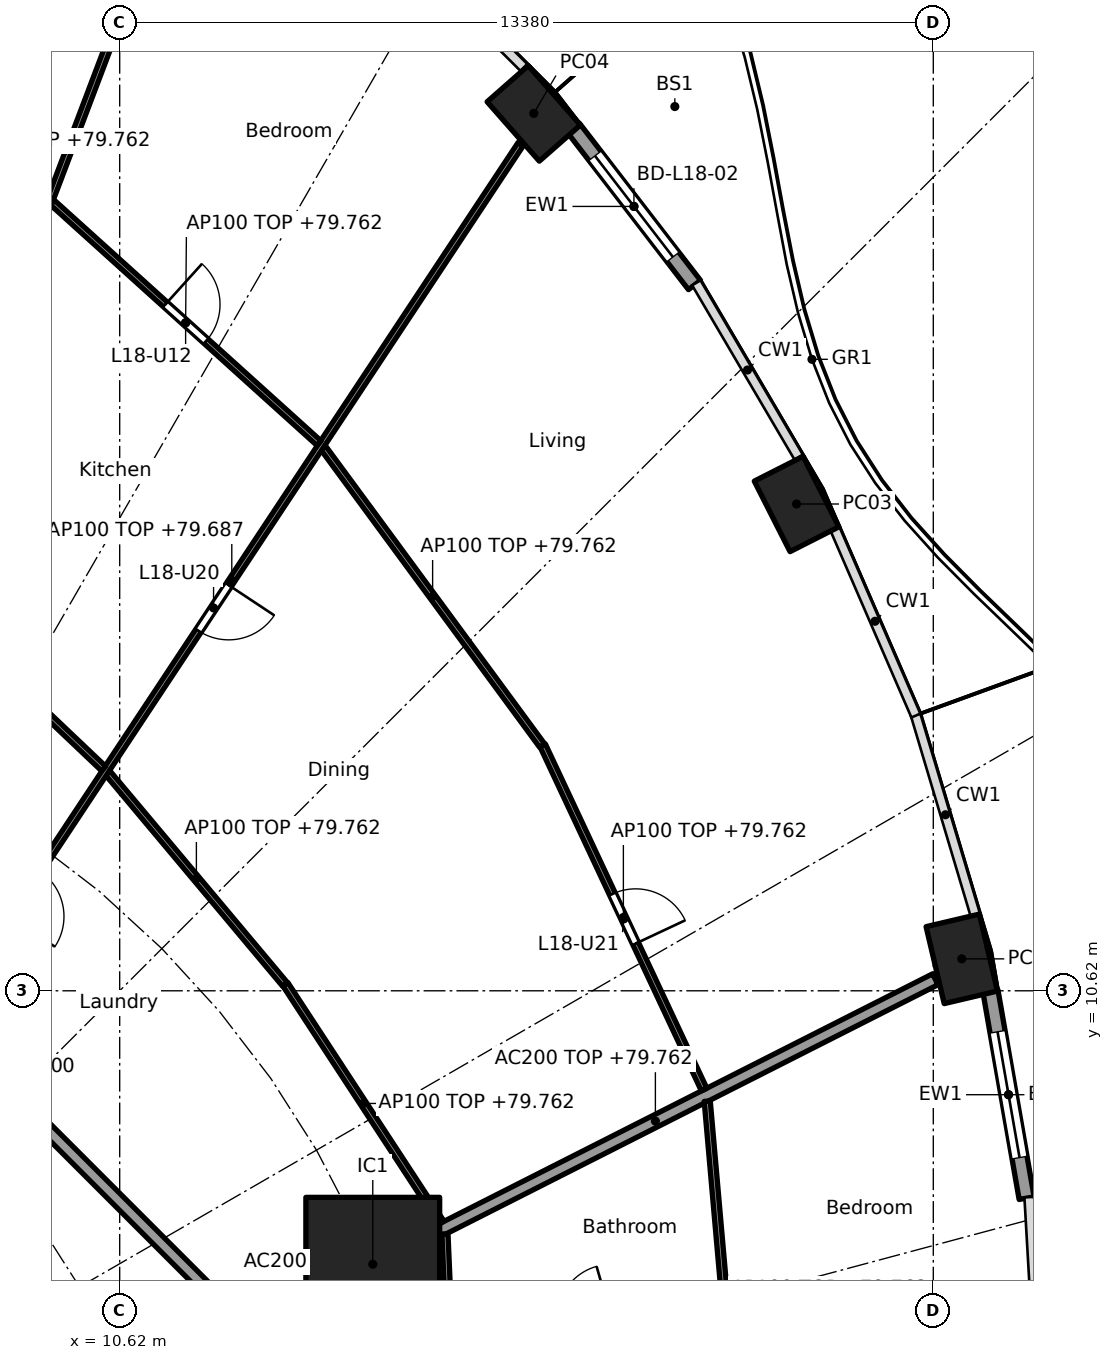
"""IFC4 building model, lengths in metres.
Left out: names, types, materials, properties, quantities, classifications, styles, units other than length and angle.
Written with IfcOpenShell. Run it as: python <this file> out.ifc"""

import sys

from ifc_helpers import new_model, si_unit, direction, frame, frame_2d, origin, origin_2d, place, context, subcontext, project, spatial, rectangle, hollow_rectangle, extrude, element, fill, save


model = new_model("IFC4")
c1 = context("Model", 3, precision=1e-05, world=origin(), true_north=direction((0.0, 1.0)))
c2 = subcontext(c1, "Body", "Model", "MODEL_VIEW")
j1 = project(units=[si_unit("LENGTHUNIT", "METRE"), si_unit("PLANEANGLEUNIT", "RADIAN")], contexts=[c1])
p1 = place(None, origin())
s1 = spatial("IfcSite", under=j1, at=p1, CompositionType="ELEMENT")
p2 = place(p1, origin())
s2 = spatial("IfcBuilding", under=s1, at=p2, CompositionType="ELEMENT")
p3 = place(p2, frame((0.0, 0.0, 77.0)))
s3 = spatial("IfcBuildingStorey", under=s2, at=p3, CompositionType="ELEMENT", Elevation=77.0)
for number, where, z_axis, x_axis in (
    (1, (24.468, 11.145, 0.0), (0.0, 0.0, 1.0), (-0.229, 0.973, 0.0)),
    (2, (21.751, 18.625, 0.0), (0.0, 0.0, 1.0), (-0.452, 0.892, 0.0)),
    (3, (17.43, 25.049, 0.0), (0.0, 0.0, 1.0), (-0.66, 0.751, 0.0)),
):
    element("IfcColumn", number, at=place(p3, frame(where, z_axis=z_axis, x_axis=x_axis)), inside=s3, PredefinedType="COLUMN", context=c2, shape_type="SweptSolid", body=[
        extrude(hollow_rectangle(XDim=1.3, YDim=0.9, WallThickness=0.045, at=origin_2d()), origin(), (0.0, 0.0, 1.0), 3.7),
    ])
p4 = place(p3, frame((14.782, 6.123, 0.0), z_axis=(0.0, 0.0, 1.0), x_axis=(1.0, 0.0, 0.0)))
e4 = element("IfcColumn", 4, at=p4, inside=s3, PredefinedType="COLUMN", context=c2, shape_type="SweptSolid", body=[
    extrude(rectangle(XDim=2.2, YDim=2.2, at=origin_2d()), origin(), (0.0, 0.0, 1.0), 3.7),
])
p5 = place(p3, frame((24.94, 10.613, 0.0), z_axis=(0.0, 0.0, 1.0), x_axis=(0.172164316671, -0.985068245385, 0.0)))
e5 = element("IfcWall", 5, at=p5, inside=s3, PredefinedType="SOLIDWALL", context=c2, shape_type="SweptSolid", body=[
    extrude(rectangle(XDim=3.454, YDim=0.25, at=frame_2d((1.727, 0.0))), origin(), (0.0, 0.0, 1.0), 3.44),
])
p6 = place(p5, frame((0.677, 0.0, 0.0)))
e6 = element("IfcOpeningElement", 6, at=p6, cuts=e5, PredefinedType="OPENING", context=c2, shape_type="SweptSolid", body=[
    extrude(rectangle(XDim=2.1, YDim=2.4, at=frame_2d((1.05, 1.2))), frame((0.0, 0.135, 0.0), z_axis=(0.0, -1.0, 0.0), x_axis=(1.0, 0.0, 0.0)), (0.0, 0.0, 1.0), 0.27),
])
p7 = place(p3, frame((18.081, 24.811, 0.0), z_axis=(0.0, 0.0, 1.0), x_axis=(0.610458970322, -0.792047880847, 0.0)))
e7 = element("IfcWall", 7, at=p7, inside=s3, PredefinedType="SOLIDWALL", context=c2, shape_type="SweptSolid", body=[
    extrude(rectangle(XDim=3.263, YDim=0.25, at=frame_2d((1.631, 0.0))), origin(), (0.0, 0.0, 1.0), 3.44),
])
p8 = place(p7, frame((0.582, 0.0, 0.0)))
e8 = element("IfcOpeningElement", 8, at=p8, cuts=e7, PredefinedType="OPENING", context=c2, shape_type="SweptSolid", body=[
    extrude(rectangle(XDim=2.1, YDim=2.4, at=frame_2d((1.05, 1.2))), frame((0.0, 0.135, 0.0), z_axis=(0.0, -1.0, 0.0), x_axis=(1.0, 0.0, 0.0)), (0.0, 0.0, 1.0), 0.27),
])
p9 = place(p3, frame((9.988, 4.613, 0.0), z_axis=(0.0, 0.0, 1.0), x_axis=(-0.707106781187, 0.707106781187, 0.0)))
e9 = element("IfcWall", 9, at=p9, inside=s3, PredefinedType="SHEAR", context=c2, shape_type="SweptSolid", body=[
    extrude(rectangle(XDim=7.602, YDim=0.6, at=frame_2d((3.801, 0.0))), origin(), (0.0, 0.0, 1.0), 3.44),
])
p10 = place(p9, frame((3.201, 0.0, 0.0)))
e10 = element("IfcOpeningElement", 10, at=p10, cuts=e9, PredefinedType="OPENING", context=c2, shape_type="SweptSolid", body=[
    extrude(rectangle(XDim=1.2, YDim=2.1, at=frame_2d((0.6, 1.05))), frame((0.0, 0.31, 0.0), z_axis=(0.0, -1.0, 0.0), x_axis=(1.0, 0.0, 0.0)), (0.0, 0.0, 1.0), 0.62),
])
p11 = place(p3, frame((12.657, 5.243, 0.0), z_axis=(0.0, 0.0, 1.0), x_axis=(0.923876145736, 0.382691608661, 0.0)))
e11 = element("IfcWall", 11, at=p11, inside=s3, PredefinedType="PARTITIONING", context=c2, shape_type="SweptSolid", body=[
    extrude(rectangle(XDim=2.2, YDim=0.2, at=frame_2d((1.1, 0.0))), origin(), (0.0, 0.0, 1.0), 3.44),
])
p12 = place(p3, frame((14.827, 6.146, 0.0), z_axis=(0.0, 0.0, 1.0), x_axis=(0.892068075337, 0.451901038906, 0.0)))
e12 = element("IfcWall", 12, at=p12, inside=s3, PredefinedType="PARTITIONING", context=c2, shape_type="SweptSolid", body=[
    extrude(rectangle(XDim=10.32, YDim=0.2, at=frame_2d((5.16, 0.0))), origin(), (0.0, 0.0, 1.0), 2.762),
])
p13 = place(p3, frame((12.635, 5.134, 0.0), z_axis=(0.0, 0.0, 1.0), x_axis=(-0.707106781187, 0.707106781187, 0.0)))
e13 = element("IfcWall", 13, at=p13, inside=s3, PredefinedType="PARTITIONING", context=c2, shape_type="SweptSolid", body=[
    extrude(rectangle(XDim=10.609, YDim=0.2, at=frame_2d((5.305, 0.0))), origin(), (0.0, 0.0, 1.0), 3.44),
])
p14 = place(p3, frame((20.825, 2.642, 0.0), z_axis=(0.0, 0.0, 1.0), x_axis=(-0.087760219522, 0.996141628419, 0.0)))
e14 = element("IfcWall", 14, at=p14, inside=s3, PredefinedType="PARTITIONING", context=c2, shape_type="SweptSolid", body=[
    extrude(rectangle(XDim=6.187, YDim=0.1, at=frame_2d((3.094, 0.0))), origin(), (0.0, 0.0, 1.0), 2.762),
])
p15 = place(p3, frame((16.064, 4.415, 0.0), z_axis=(0.0, 0.0, 1.0), x_axis=(-0.043101501373, 0.999070698489, 0.0)))
e15 = element("IfcWall", 15, at=p15, inside=s3, PredefinedType="PARTITIONING", context=c2, shape_type="SweptSolid", body=[
    extrude(rectangle(XDim=2.209, YDim=0.1, at=frame_2d((1.104, 0.0))), origin(), (0.0, 0.0, 1.0), 3.44),
])
p16 = place(p3, frame((15.91, 6.806, 0.0), z_axis=(0.0, 0.0, 1.0), x_axis=(-0.547468243486, 0.836826458936, 0.0)))
e16 = element("IfcWall", 16, at=p16, inside=s3, PredefinedType="PARTITIONING", context=c2, shape_type="SweptSolid", body=[
    extrude(rectangle(XDim=4.688, YDim=0.1, at=frame_2d((2.344, 0.0))), origin(), (0.0, 0.0, 1.0), 2.762),
])
p17 = place(p3, frame((20.231, 8.995, 0.0), z_axis=(0.0, 0.0, 1.0), x_axis=(-0.424587886407, 0.905386727712, 0.0)))
e17 = element("IfcWall", 17, at=p17, inside=s3, PredefinedType="PARTITIONING", context=c2, shape_type="SweptSolid", body=[
    extrude(rectangle(XDim=6.254, YDim=0.1, at=frame_2d((3.127, 0.0))), origin(), (0.0, 0.0, 1.0), 2.762),
])
p18 = place(p17, frame((2.652, 0.0, 0.0)))
e18 = element("IfcOpeningElement", 18, at=p18, cuts=e17, PredefinedType="OPENING", context=c2, shape_type="SweptSolid", body=[
    extrude(rectangle(XDim=0.9, YDim=2.1, at=frame_2d((0.45, 1.05))), frame((0.0, 0.06, 0.0), z_axis=(0.0, -1.0, 0.0), x_axis=(1.0, 0.0, 0.0)), (0.0, 0.0, 1.0), 0.12),
])
p19 = place(p3, frame((13.339, 10.725, 0.0), z_axis=(0.0, 0.0, 1.0), x_axis=(-0.642515455924, 0.766272724882, 0.0)))
e19 = element("IfcWall", 19, at=p19, inside=s3, PredefinedType="PARTITIONING", context=c2, shape_type="SweptSolid", body=[
    extrude(rectangle(XDim=4.537, YDim=0.1, at=frame_2d((2.269, 0.0))), origin(), (0.0, 0.0, 1.0), 2.762),
])
p20 = place(p3, frame((17.567, 14.653, 0.0), z_axis=(0.0, 0.0, 1.0), x_axis=(-0.592391983588, 0.80564988536, 0.0)))
e20 = element("IfcWall", 20, at=p20, inside=s3, PredefinedType="PARTITIONING", context=c2, shape_type="SweptSolid", body=[
    extrude(rectangle(XDim=6.08, YDim=0.1, at=frame_2d((3.04, 0.0))), origin(), (0.0, 0.0, 1.0), 2.762),
])
p21 = place(p3, frame((7.713, 10.195, 0.0), z_axis=(0.0, 0.0, 1.0), x_axis=(0.552111071171, 0.833770571015, 0.0)))
e21 = element("IfcWall", 21, at=p21, inside=s3, PredefinedType="PARTITIONING", context=c2, shape_type="SweptSolid", body=[
    extrude(rectangle(XDim=17.208, YDim=0.1, at=frame_2d((8.604, 0.0))), origin(), (0.0, 0.0, 1.0), 2.687),
])
p22 = place(p21, frame((1.976, 0.0, 0.0)))
e22 = element("IfcOpeningElement", 22, at=p22, cuts=e21, PredefinedType="OPENING", context=c2, shape_type="SweptSolid", body=[
    extrude(rectangle(XDim=0.9, YDim=2.1, at=frame_2d((0.45, 1.05))), frame((0.0, 0.06, 0.0), z_axis=(0.0, -1.0, 0.0), x_axis=(1.0, 0.0, 0.0)), (0.0, 0.0, 1.0), 0.12),
])
p23 = place(p21, frame((7.611, 0.0, 0.0)))
e23 = element("IfcOpeningElement", 23, at=p23, cuts=e21, PredefinedType="OPENING", context=c2, shape_type="SweptSolid", body=[
    extrude(rectangle(XDim=0.9, YDim=2.1, at=frame_2d((0.45, 1.05))), frame((0.0, 0.06, 0.0), z_axis=(0.0, -1.0, 0.0), x_axis=(1.0, 0.0, 0.0)), (0.0, 0.0, 1.0), 0.12),
])
p24 = place(p3, frame((10.355, 14.274, 0.0), z_axis=(0.0, 0.0, 1.0), x_axis=(-0.725219204328, 0.688518050361, 0.0)))
e24 = element("IfcWall", 24, at=p24, inside=s3, PredefinedType="PARTITIONING", context=c2, shape_type="SweptSolid", body=[
    extrude(rectangle(XDim=4.437, YDim=0.1, at=frame_2d((2.219, 0.0))), origin(), (0.0, 0.0, 1.0), 2.762),
])
p25 = place(p3, frame((13.898, 19.625, 0.0), z_axis=(0.0, 0.0, 1.0), x_axis=(-0.742400132046, 0.669956747812, 0.0)))
e25 = element("IfcWall", 25, at=p25, inside=s3, PredefinedType="PARTITIONING", context=c2, shape_type="SweptSolid", body=[
    extrude(rectangle(XDim=5.911, YDim=0.1, at=frame_2d((2.956, 0.0))), origin(), (0.0, 0.0, 1.0), 2.762),
])
p26 = place(p25, frame((2.506, 0.0, 0.0)))
e26 = element("IfcOpeningElement", 26, at=p26, cuts=e25, PredefinedType="OPENING", context=c2, shape_type="SweptSolid", body=[
    extrude(rectangle(XDim=0.9, YDim=2.1, at=frame_2d((0.45, 1.05))), frame((0.0, 0.06, 0.0), z_axis=(0.0, -1.0, 0.0), x_axis=(1.0, 0.0, 0.0)), (0.0, 0.0, 1.0), 0.12),
])
p27 = place(p3, frame((6.141, 14.829, 0.0), z_axis=(0.0, 0.0, 1.0), x_axis=(0.354477134193, 0.935064682968, 0.0)))
e27 = element("IfcWall", 27, at=p27, inside=s3, PredefinedType="PARTITIONING", context=c2, shape_type="SweptSolid", body=[
    extrude(rectangle(XDim=15.626, YDim=0.1, at=frame_2d((7.813, 0.0))), origin(), (0.0, 0.0, 1.0), 2.762),
])
p28 = place(p27, frame((1.35, 0.0, 0.0)))
e28 = element("IfcOpeningElement", 28, at=p28, cuts=e27, PredefinedType="OPENING", context=c2, shape_type="SweptSolid", body=[
    extrude(rectangle(XDim=0.9, YDim=2.1, at=frame_2d((0.45, 1.05))), frame((0.0, 0.06, 0.0), z_axis=(0.0, -1.0, 0.0), x_axis=(1.0, 0.0, 0.0)), (0.0, 0.0, 1.0), 0.12),
])
p29 = place(p27, frame((5.606, 0.0, 0.0)))
e29 = element("IfcOpeningElement", 29, at=p29, cuts=e27, PredefinedType="OPENING", context=c2, shape_type="SweptSolid", body=[
    extrude(rectangle(XDim=0.9, YDim=2.1, at=frame_2d((0.45, 1.05))), frame((0.0, 0.06, 0.0), z_axis=(0.0, -1.0, 0.0), x_axis=(1.0, 0.0, 0.0)), (0.0, 0.0, 1.0), 0.12),
])
p30 = place(p6, origin())
e30 = element("IfcDoor", 30, at=p30, inside=s3, OperationType="SLIDING_TO_LEFT", PredefinedType="DOOR", context=c2, shape_type="SweptSolid", body=[
    extrude(rectangle(XDim=2.1, YDim=2.4, at=frame_2d((1.05, 1.2))), frame((0.0, 0.025, 0.0), z_axis=(0.0, -1.0, 0.0), x_axis=(1.0, 0.0, 0.0)), (0.0, 0.0, 1.0), 0.05),
])
fill(e6, e30)
p31 = place(p8, origin())
e31 = element("IfcDoor", 31, at=p31, inside=s3, OperationType="SLIDING_TO_LEFT", PredefinedType="DOOR", context=c2, shape_type="SweptSolid", body=[
    extrude(rectangle(XDim=2.1, YDim=2.4, at=frame_2d((1.05, 1.2))), frame((0.0, 0.025, 0.0), z_axis=(0.0, -1.0, 0.0), x_axis=(1.0, 0.0, 0.0)), (0.0, 0.0, 1.0), 0.05),
])
fill(e8, e31)
p32 = place(p26, frame((0.9, 0.0, 0.0), x_axis=(-1.0, 0.0, 0.0)))
e32 = element("IfcDoor", 32, at=p32, inside=s3, OperationType="SINGLE_SWING_LEFT", PredefinedType="DOOR", context=c2, shape_type="SweptSolid", body=[
    extrude(rectangle(XDim=0.9, YDim=2.1, at=frame_2d((0.45, 1.05))), frame((0.0, 0.025, 0.0), z_axis=(0.0, -1.0, 0.0), x_axis=(1.0, 0.0, 0.0)), (0.0, 0.0, 1.0), 0.05),
])
fill(e26, e32)
p33 = place(p23, frame((0.9, 0.0, 0.0), x_axis=(-1.0, 0.0, 0.0)))
e33 = element("IfcDoor", 33, at=p33, inside=s3, OperationType="SINGLE_SWING_LEFT", PredefinedType="DOOR", context=c2, shape_type="SweptSolid", body=[
    extrude(rectangle(XDim=0.9, YDim=2.1, at=frame_2d((0.45, 1.05))), frame((0.0, 0.025, 0.0), z_axis=(0.0, -1.0, 0.0), x_axis=(1.0, 0.0, 0.0)), (0.0, 0.0, 1.0), 0.05),
])
fill(e23, e33)
p34 = place(p18, frame((0.9, 0.0, 0.0), x_axis=(-1.0, 0.0, 0.0)))
e34 = element("IfcDoor", 34, at=p34, inside=s3, OperationType="SINGLE_SWING_RIGHT", PredefinedType="DOOR", context=c2, shape_type="SweptSolid", body=[
    extrude(rectangle(XDim=0.9, YDim=2.1, at=frame_2d((0.45, 1.05))), frame((0.0, 0.025, 0.0), z_axis=(0.0, -1.0, 0.0), x_axis=(1.0, 0.0, 0.0)), (0.0, 0.0, 1.0), 0.05),
])
fill(e18, e34)
save(model, sys.argv[1])
